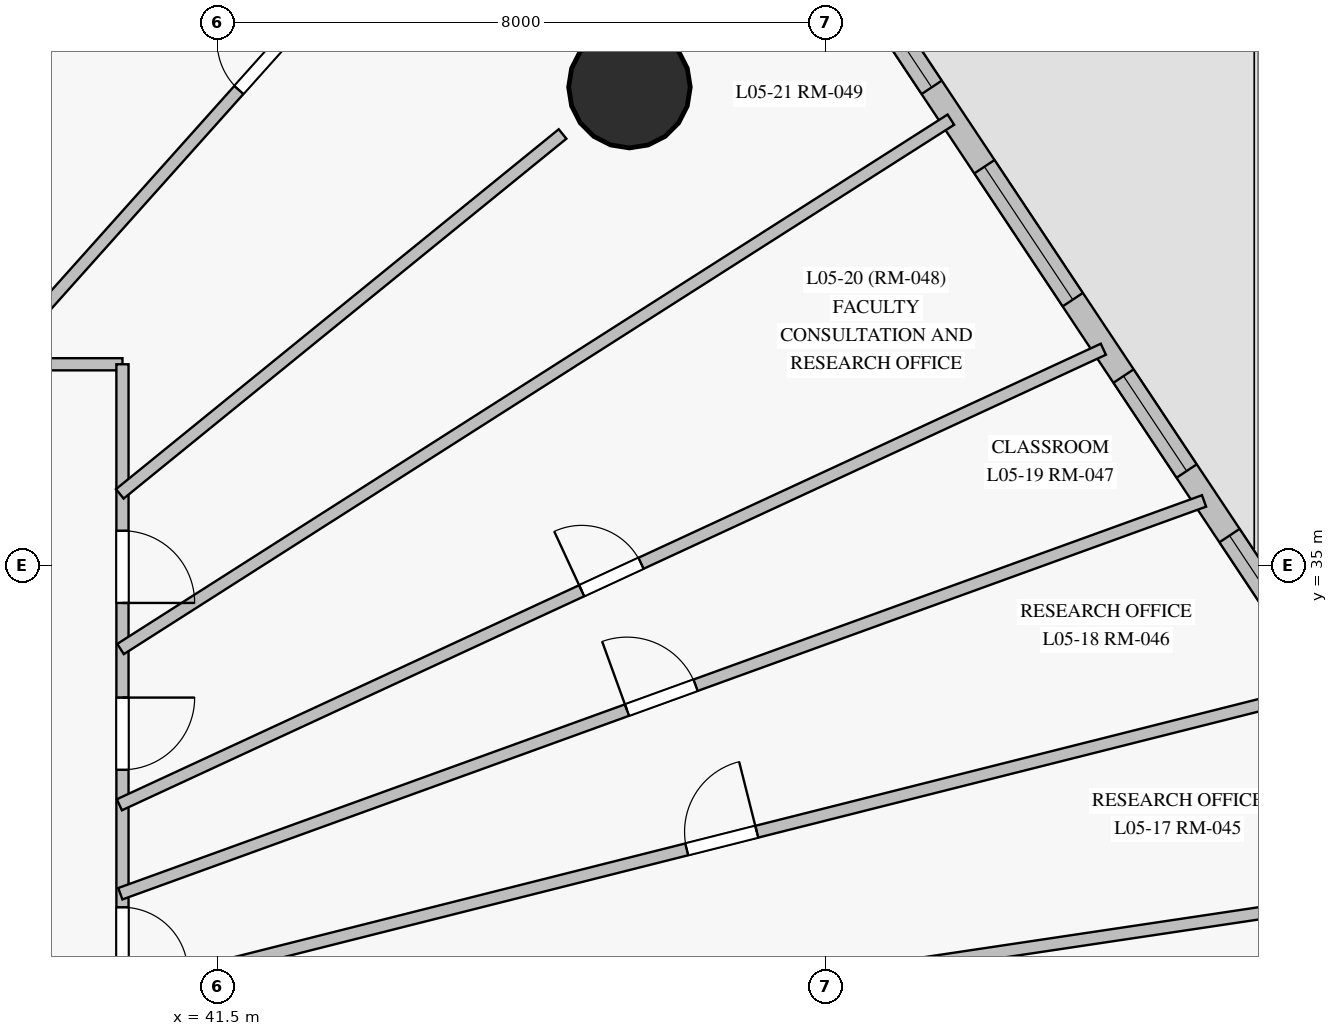
"""IFC4 building model, lengths in metres.
Left out: names, types, materials, properties, quantities, classifications, styles, units other than length and angle.
Written with IfcOpenShell. Run it as: python <this file> out.ifc"""

import sys

from ifc_helpers import new_model, si_unit, direction, frame, frame_2d, origin, origin_with_axes, origin_2d, place, context, subcontext, project, spatial, rectangle, circle, extrude, source, transform, mapped, element, fill, save


model = new_model("IFC4")
c1 = context("Model", 3, precision=1e-05, world=origin(), true_north=direction((0.0, 1.0)))
c2 = subcontext(c1, "Body", "Model", "MODEL_VIEW")
j1 = project(units=[si_unit("LENGTHUNIT", "METRE"), si_unit("PLANEANGLEUNIT", "RADIAN")], contexts=[c1])
p1 = place(None, origin())
s1 = spatial("IfcSite", under=j1, at=p1, CompositionType="ELEMENT")
p2 = place(p1, origin())
s2 = spatial("IfcBuilding", under=s1, at=p2, CompositionType="ELEMENT")
p3 = place(p2, frame((0.0, 0.0, 22.5)))
s3 = spatial("IfcBuildingStorey", under=s2, at=p3, CompositionType="ELEMENT", Elevation=22.5)
m1 = source(origin_with_axes(), c2, "Body", "SweptSolid", [
    extrude(circle(Radius=0.8, at=origin_2d()), origin(), (0.0, 0.0, 1.0), 4.0),
])
p4 = place(p3, frame((46.92, 41.296, 0.0), z_axis=(0.0, 0.0, 1.0), x_axis=(1.0, 0.0, 0.0)))
e1 = element("IfcColumn", 1, at=p4, inside=s3, PredefinedType="COLUMN", context=c2, shape_type="MappedRepresentation", body=[
    mapped(m1, transform((0.0, 0.0, 0.0), scale=1.0)),
])
p5 = place(p3, frame((54.797, 22.363, 0.0), z_axis=(0.0, 0.0, 1.0), x_axis=(0.148832722849, 0.988862387094, 0.0)))
e2 = element("IfcWall", 2, at=p5, inside=s3, PredefinedType="SOLIDWALL", context=c2, shape_type="SweptSolid", body=[
    extrude(rectangle(XDim=10.767, YDim=0.32, at=frame_2d((5.384, 0.0))), origin(), (0.0, 0.0, 1.0), 3.75),
])
p6 = place(p5, frame((0.574, 0.0, 0.85)))
e3 = element("IfcOpeningElement", 3, at=p6, cuts=e2, PredefinedType="OPENING", context=c2, shape_type="SweptSolid", body=[
    extrude(rectangle(XDim=1.8, YDim=1.85, at=frame_2d((0.9, 0.925))), frame((0.0, 0.17, 0.0), z_axis=(0.0, -1.0, 0.0), x_axis=(1.0, 0.0, 0.0)), (0.0, 0.0, 1.0), 0.34),
])
p7 = place(p5, frame((3.426, 0.0, 0.85)))
e4 = element("IfcOpeningElement", 4, at=p7, cuts=e2, PredefinedType="OPENING", context=c2, shape_type="SweptSolid", body=[
    extrude(rectangle(XDim=2.1, YDim=1.95, at=frame_2d((1.05, 0.975))), frame((0.0, 0.17, 0.0), z_axis=(0.0, -1.0, 0.0), x_axis=(1.0, 0.0, 0.0)), (0.0, 0.0, 1.0), 0.34),
])
p8 = place(p5, frame((8.734, 0.0, 0.85)))
e5 = element("IfcOpeningElement", 5, at=p8, cuts=e2, PredefinedType="OPENING", context=c2, shape_type="SweptSolid", body=[
    extrude(rectangle(XDim=1.5, YDim=1.85, at=frame_2d((0.75, 0.925))), frame((0.0, 0.17, 0.0), z_axis=(0.0, -1.0, 0.0), x_axis=(1.0, 0.0, 0.0)), (0.0, 0.0, 1.0), 0.34),
])
p9 = place(p3, frame((56.4, 33.01, 0.0), z_axis=(0.0, 0.0, 1.0), x_axis=(-0.553428968968, 0.832896377893, 0.0)))
e6 = element("IfcWall", 6, at=p9, inside=s3, PredefinedType="SOLIDWALL", context=c2, shape_type="SweptSolid", body=[
    extrude(rectangle(XDim=13.391, YDim=0.32, at=frame_2d((6.696, 0.0))), origin(), (0.0, 0.0, 1.0), 3.75),
])
p10 = place(p9, frame((1.064, 0.0, 0.85)))
e7 = element("IfcOpeningElement", 7, at=p10, cuts=e6, PredefinedType="OPENING", context=c2, shape_type="SweptSolid", body=[
    extrude(rectangle(XDim=1.8, YDim=1.85, at=frame_2d((0.9, 0.925))), frame((0.0, 0.17, 0.0), z_axis=(0.0, -1.0, 0.0), x_axis=(1.0, 0.0, 0.0)), (0.0, 0.0, 1.0), 0.34),
])
p11 = place(p9, frame((3.884, 0.0, 0.85)))
e8 = element("IfcOpeningElement", 8, at=p11, cuts=e6, PredefinedType="OPENING", context=c2, shape_type="SweptSolid", body=[
    extrude(rectangle(XDim=1.5, YDim=1.85, at=frame_2d((0.75, 0.925))), frame((0.0, 0.17, 0.0), z_axis=(0.0, -1.0, 0.0), x_axis=(1.0, 0.0, 0.0)), (0.0, 0.0, 1.0), 0.34),
])
p12 = place(p9, frame((6.591, 0.0, 0.85)))
e9 = element("IfcOpeningElement", 9, at=p12, cuts=e6, PredefinedType="OPENING", context=c2, shape_type="SweptSolid", body=[
    extrude(rectangle(XDim=2.1, YDim=1.95, at=frame_2d((1.05, 0.975))), frame((0.0, 0.17, 0.0), z_axis=(0.0, -1.0, 0.0), x_axis=(1.0, 0.0, 0.0)), (0.0, 0.0, 1.0), 0.34),
])
p13 = place(p9, frame((9.945, 0.0, 0.85)))
e10 = element("IfcOpeningElement", 10, at=p13, cuts=e6, PredefinedType="OPENING", context=c2, shape_type="SweptSolid", body=[
    extrude(rectangle(XDim=2.1, YDim=1.95, at=frame_2d((1.05, 0.975))), frame((0.0, 0.17, 0.0), z_axis=(0.0, -1.0, 0.0), x_axis=(1.0, 0.0, 0.0)), (0.0, 0.0, 1.0), 0.34),
])
p14 = place(p3, frame((10.5, 37.65, 0.0), z_axis=(0.0, 0.0, 1.0), x_axis=(1.0, 0.0, 0.0)))
e11 = element("IfcWall", 11, at=p14, inside=s3, PredefinedType="PARTITIONING", context=c2, shape_type="SweptSolid", body=[
    extrude(rectangle(XDim=29.75, YDim=0.16, at=frame_2d((14.875, 0.0))), origin(), (0.0, 0.0, 1.0), 3.15),
])
p15 = place(p14, frame((26.813, 0.0, 0.0)))
e12 = element("IfcOpeningElement", 12, at=p15, cuts=e11, PredefinedType="OPENING", context=c2, shape_type="SweptSolid", body=[
    extrude(rectangle(XDim=0.96, YDim=2.15, at=frame_2d((0.48, 1.075))), frame((0.0, 0.09, 0.0), z_axis=(0.0, -1.0, 0.0), x_axis=(1.0, 0.0, 0.0)), (0.0, 0.0, 1.0), 0.18),
])
p16 = place(p14, frame((24.312, 0.0, 0.0)))
e13 = element("IfcOpeningElement", 13, at=p16, cuts=e11, PredefinedType="OPENING", context=c2, shape_type="SweptSolid", body=[
    extrude(rectangle(XDim=0.95, YDim=2.15, at=frame_2d((0.475, 1.075))), frame((0.0, 0.09, 0.0), z_axis=(0.0, -1.0, 0.0), x_axis=(1.0, 0.0, 0.0)), (0.0, 0.0, 1.0), 0.18),
])
p17 = place(p14, frame((21.84, 0.0, 0.0)))
e14 = element("IfcOpeningElement", 14, at=p17, cuts=e11, PredefinedType="OPENING", context=c2, shape_type="SweptSolid", body=[
    extrude(rectangle(XDim=0.95, YDim=2.15, at=frame_2d((0.475, 1.075))), frame((0.0, 0.09, 0.0), z_axis=(0.0, -1.0, 0.0), x_axis=(1.0, 0.0, 0.0)), (0.0, 0.0, 1.0), 0.18),
])
p18 = place(p14, frame((19.498, 0.0, 0.0)))
e15 = element("IfcOpeningElement", 15, at=p18, cuts=e11, PredefinedType="OPENING", context=c2, shape_type="SweptSolid", body=[
    extrude(rectangle(XDim=0.96, YDim=2.15, at=frame_2d((0.48, 1.075))), frame((0.0, 0.09, 0.0), z_axis=(0.0, -1.0, 0.0), x_axis=(1.0, 0.0, 0.0)), (0.0, 0.0, 1.0), 0.18),
])
p19 = place(p14, frame((17.272, 0.0, 0.0)))
e16 = element("IfcOpeningElement", 16, at=p19, cuts=e11, PredefinedType="OPENING", context=c2, shape_type="SweptSolid", body=[
    extrude(rectangle(XDim=0.95, YDim=2.15, at=frame_2d((0.475, 1.075))), frame((0.0, 0.09, 0.0), z_axis=(0.0, -1.0, 0.0), x_axis=(1.0, 0.0, 0.0)), (0.0, 0.0, 1.0), 0.18),
])
p20 = place(p14, frame((15.625, 0.0, 0.0)))
e17 = element("IfcOpeningElement", 17, at=p20, cuts=e11, PredefinedType="OPENING", context=c2, shape_type="SweptSolid", body=[
    extrude(rectangle(XDim=0.95, YDim=2.15, at=frame_2d((0.475, 1.075))), frame((0.0, 0.09, 0.0), z_axis=(0.0, -1.0, 0.0), x_axis=(1.0, 0.0, 0.0)), (0.0, 0.0, 1.0), 0.18),
])
p21 = place(p14, frame((14.4, 0.0, 0.0)))
e18 = element("IfcOpeningElement", 18, at=p21, cuts=e11, PredefinedType="OPENING", context=c2, shape_type="SweptSolid", body=[
    extrude(rectangle(XDim=0.96, YDim=2.15, at=frame_2d((0.48, 1.075))), frame((0.0, 0.09, 0.0), z_axis=(0.0, -1.0, 0.0), x_axis=(1.0, 0.0, 0.0)), (0.0, 0.0, 1.0), 0.18),
])
p22 = place(p14, frame((9.938, 0.0, 0.0)))
e19 = element("IfcOpeningElement", 19, at=p22, cuts=e11, PredefinedType="OPENING", context=c2, shape_type="SweptSolid", body=[
    extrude(rectangle(XDim=0.95, YDim=2.15, at=frame_2d((0.475, 1.075))), frame((0.0, 0.09, 0.0), z_axis=(0.0, -1.0, 0.0), x_axis=(1.0, 0.0, 0.0)), (0.0, 0.0, 1.0), 0.18),
])
p23 = place(p3, frame((40.25, 37.65, 0.0), z_axis=(0.0, 0.0, 1.0), x_axis=(0.0, -1.0, 0.0)))
e20 = element("IfcWall", 20, at=p23, inside=s3, PredefinedType="PARTITIONING", context=c2, shape_type="SweptSolid", body=[
    extrude(rectangle(XDim=22.3, YDim=0.16, at=frame_2d((11.15, 0.0))), origin(), (0.0, 0.0, 1.0), 3.15),
])
p24 = place(p23, frame((16.25, 0.0, 0.0)))
e21 = element("IfcOpeningElement", 21, at=p24, cuts=e20, PredefinedType="OPENING", context=c2, shape_type="SweptSolid", body=[
    extrude(rectangle(XDim=0.95, YDim=2.15, at=frame_2d((0.475, 1.075))), frame((0.0, 0.09, 0.0), z_axis=(0.0, -1.0, 0.0), x_axis=(1.0, 0.0, 0.0)), (0.0, 0.0, 1.0), 0.18),
])
p25 = place(p23, frame((14.06, 0.0, 0.0)))
e22 = element("IfcOpeningElement", 22, at=p25, cuts=e20, PredefinedType="OPENING", context=c2, shape_type="SweptSolid", body=[
    extrude(rectangle(XDim=0.96, YDim=2.15, at=frame_2d((0.48, 1.075))), frame((0.0, 0.09, 0.0), z_axis=(0.0, -1.0, 0.0), x_axis=(1.0, 0.0, 0.0)), (0.0, 0.0, 1.0), 0.18),
])
p26 = place(p23, frame((12.235, 0.0, 0.0)))
e23 = element("IfcOpeningElement", 23, at=p26, cuts=e20, PredefinedType="OPENING", context=c2, shape_type="SweptSolid", body=[
    extrude(rectangle(XDim=0.95, YDim=2.15, at=frame_2d((0.475, 1.075))), frame((0.0, 0.09, 0.0), z_axis=(0.0, -1.0, 0.0), x_axis=(1.0, 0.0, 0.0)), (0.0, 0.0, 1.0), 0.18),
])
p27 = place(p23, frame((4.385, 0.0, 0.0)))
e24 = element("IfcOpeningElement", 24, at=p27, cuts=e20, PredefinedType="OPENING", context=c2, shape_type="SweptSolid", body=[
    extrude(rectangle(XDim=0.95, YDim=2.15, at=frame_2d((0.475, 1.075))), frame((0.0, 0.09, 0.0), z_axis=(0.0, -1.0, 0.0), x_axis=(1.0, 0.0, 0.0)), (0.0, 0.0, 1.0), 0.18),
])
p28 = place(p23, frame((2.19, 0.0, 0.0)))
e25 = element("IfcOpeningElement", 25, at=p28, cuts=e20, PredefinedType="OPENING", context=c2, shape_type="SweptSolid", body=[
    extrude(rectangle(XDim=0.95, YDim=2.15, at=frame_2d((0.475, 1.075))), frame((0.0, 0.09, 0.0), z_axis=(0.0, -1.0, 0.0), x_axis=(1.0, 0.0, 0.0)), (0.0, 0.0, 1.0), 0.18),
])
p29 = place(p23, frame((17.358, 0.0, 0.0)))
e26 = element("IfcOpeningElement", 26, at=p29, cuts=e20, PredefinedType="OPENING", context=c2, shape_type="SweptSolid", body=[
    extrude(rectangle(XDim=0.95, YDim=2.15, at=frame_2d((0.475, 1.075))), frame((0.0, 0.09, 0.0), z_axis=(0.0, -1.0, 0.0), x_axis=(1.0, 0.0, 0.0)), (0.0, 0.0, 1.0), 0.18),
])
p30 = place(p23, frame((18.489, 0.0, 0.0)))
e27 = element("IfcOpeningElement", 27, at=p30, cuts=e20, PredefinedType="OPENING", context=c2, shape_type="SweptSolid", body=[
    extrude(rectangle(XDim=0.95, YDim=2.15, at=frame_2d((0.475, 1.075))), frame((0.0, 0.09, 0.0), z_axis=(0.0, -1.0, 0.0), x_axis=(1.0, 0.0, 0.0)), (0.0, 0.0, 1.0), 0.18),
])
p31 = place(p23, frame((10.61, 0.0, 0.0)))
e28 = element("IfcOpeningElement", 28, at=p31, cuts=e20, PredefinedType="OPENING", context=c2, shape_type="SweptSolid", body=[
    extrude(rectangle(XDim=0.86, YDim=2.04, at=frame_2d((0.43, 1.02))), frame((0.0, 0.09, 0.0), z_axis=(0.0, -1.0, 0.0), x_axis=(1.0, 0.0, 0.0)), (0.0, 0.0, 1.0), 0.18),
])
p32 = place(p23, frame((8.378, 0.0, 0.0)))
e29 = element("IfcOpeningElement", 29, at=p32, cuts=e20, PredefinedType="OPENING", context=c2, shape_type="SweptSolid", body=[
    extrude(rectangle(XDim=0.86, YDim=2.04, at=frame_2d((0.43, 1.02))), frame((0.0, 0.09, 0.0), z_axis=(0.0, -1.0, 0.0), x_axis=(1.0, 0.0, 0.0)), (0.0, 0.0, 1.0), 0.18),
])
p33 = place(p23, frame((7.144, 0.0, 0.0)))
e30 = element("IfcOpeningElement", 30, at=p33, cuts=e20, PredefinedType="OPENING", context=c2, shape_type="SweptSolid", body=[
    extrude(rectangle(XDim=0.86, YDim=2.04, at=frame_2d((0.43, 1.02))), frame((0.0, 0.09, 0.0), z_axis=(0.0, -1.0, 0.0), x_axis=(1.0, 0.0, 0.0)), (0.0, 0.0, 1.0), 0.18),
])
p34 = place(p3, frame((40.206, 29.387, 0.0), z_axis=(0.0, 0.0, 1.0), x_axis=(0.969703998049, 0.24428294285, 0.0)))
e31 = element("IfcWall", 31, at=p34, inside=s3, PredefinedType="PARTITIONING", context=c2, shape_type="SweptSolid", body=[
    extrude(rectangle(XDim=16.401, YDim=0.16, at=frame_2d((8.201, 0.0))), origin(), (0.0, 0.0, 1.0), 3.75),
])
p35 = place(p34, frame((7.701, 0.0, 0.0)))
e32 = element("IfcOpeningElement", 32, at=p35, cuts=e31, PredefinedType="OPENING", context=c2, shape_type="SweptSolid", body=[
    extrude(rectangle(XDim=0.95, YDim=2.15, at=frame_2d((0.475, 1.075))), frame((0.0, 0.09, 0.0), z_axis=(0.0, -1.0, 0.0), x_axis=(1.0, 0.0, 0.0)), (0.0, 0.0, 1.0), 0.18),
])
p36 = place(p3, frame((40.22, 28.189, 0.0), z_axis=(0.0, 0.0, 1.0), x_axis=(0.989031993376, 0.147701442372, 0.0)))
e33 = element("IfcWall", 33, at=p36, inside=s3, PredefinedType="PARTITIONING", context=c2, shape_type="SweptSolid", body=[
    extrude(rectangle(XDim=15.956, YDim=0.16, at=frame_2d((7.978, 0.0))), origin(), (0.0, 0.0, 1.0), 3.75),
])
p37 = place(p3, frame((40.222, 30.685, 0.0), z_axis=(0.0, 0.0, 1.0), x_axis=(0.940161852345, 0.340728178166, 0.0)))
e34 = element("IfcWall", 34, at=p37, inside=s3, PredefinedType="PARTITIONING", context=c2, shape_type="SweptSolid", body=[
    extrude(rectangle(XDim=15.165, YDim=0.16, at=frame_2d((7.583, 0.0))), origin(), (0.0, 0.0, 1.0), 3.75),
])
p38 = place(p37, frame((7.09, 0.0, 0.0)))
e35 = element("IfcOpeningElement", 35, at=p38, cuts=e34, PredefinedType="OPENING", context=c2, shape_type="SweptSolid", body=[
    extrude(rectangle(XDim=0.96, YDim=2.15, at=frame_2d((0.48, 1.075))), frame((0.0, 0.09, 0.0), z_axis=(0.0, -1.0, 0.0), x_axis=(1.0, 0.0, 0.0)), (0.0, 0.0, 1.0), 0.18),
])
p39 = place(p3, frame((40.209, 31.855, 0.0), z_axis=(0.0, 0.0, 1.0), x_axis=(0.907470894389, 0.420114955502, 0.0)))
e36 = element("IfcWall", 36, at=p39, inside=s3, PredefinedType="PARTITIONING", context=c2, shape_type="SweptSolid", body=[
    extrude(rectangle(XDim=14.266, YDim=0.16, at=frame_2d((7.133, 0.0))), origin(), (0.0, 0.0, 1.0), 3.75),
])
p40 = place(p39, frame((6.703, 0.0, 0.0)))
e37 = element("IfcOpeningElement", 37, at=p40, cuts=e36, PredefinedType="OPENING", context=c2, shape_type="SweptSolid", body=[
    extrude(rectangle(XDim=0.86, YDim=2.04, at=frame_2d((0.43, 1.02))), frame((0.0, 0.09, 0.0), z_axis=(0.0, -1.0, 0.0), x_axis=(1.0, 0.0, 0.0)), (0.0, 0.0, 1.0), 0.18),
])
p41 = place(p3, frame((40.225, 33.904, 0.0), z_axis=(0.0, 0.0, 1.0), x_axis=(0.843218121952, 0.537571575524, 0.0)))
e38 = element("IfcWall", 38, at=p41, inside=s3, PredefinedType="PARTITIONING", context=c2, shape_type="SweptSolid", body=[
    extrude(rectangle(XDim=12.955, YDim=0.16, at=frame_2d((6.478, 0.0))), origin(), (0.0, 0.0, 1.0), 3.75),
])
p42 = place(p3, frame((36.01, 37.613, 0.0), z_axis=(0.0, 0.0, 1.0), x_axis=(0.556249955488, 0.831015034172, 0.0)))
e39 = element("IfcWall", 39, at=p42, inside=s3, PredefinedType="PARTITIONING", context=c2, shape_type="SweptSolid", body=[
    extrude(rectangle(XDim=11.771, YDim=0.16, at=frame_2d((5.886, 0.0))), origin(), (0.0, 0.0, 1.0), 3.75),
])
p43 = place(p3, frame((38.524, 37.616, 0.0), z_axis=(0.0, 0.0, 1.0), x_axis=(0.666694800969, 0.745330827459, 0.0)))
e40 = element("IfcWall", 40, at=p43, inside=s3, PredefinedType="PARTITIONING", context=c2, shape_type="SweptSolid", body=[
    extrude(rectangle(XDim=10.913, YDim=0.16, at=frame_2d((5.457, 0.0))), origin(), (0.0, 0.0, 1.0), 3.75),
])
p44 = place(p43, frame((4.886, 0.0, 0.0)))
e41 = element("IfcOpeningElement", 41, at=p44, cuts=e40, PredefinedType="OPENING", context=c2, shape_type="SweptSolid", body=[
    extrude(rectangle(XDim=0.86, YDim=2.04, at=frame_2d((0.43, 1.02))), frame((0.0, 0.09, 0.0), z_axis=(0.0, -1.0, 0.0), x_axis=(1.0, 0.0, 0.0)), (0.0, 0.0, 1.0), 0.18),
])
p45 = place(p3, frame((40.215, 35.945, 0.0), z_axis=(0.0, 0.0, 1.0), x_axis=(0.77599360837, 0.630740770657, 0.0)))
e42 = element("IfcWall", 42, at=p45, inside=s3, PredefinedType="PARTITIONING", context=c2, shape_type="SweptSolid", body=[
    extrude(rectangle(XDim=7.506, YDim=0.16, at=frame_2d((3.753, 0.0))), origin(), (0.0, 0.0, 1.0), 3.1),
])
m2 = source(origin_with_axes(), c2, "Body", "SweptSolid", [
    extrude(rectangle(XDim=1.8, YDim=1.85, at=frame_2d((0.9, 0.925))), frame((0.0, 0.03, 0.0), z_axis=(0.0, -1.0, 0.0), x_axis=(1.0, 0.0, 0.0)), (0.0, 0.0, 1.0), 0.06),
])
p46 = place(p10, origin())
e43 = element("IfcWindow", 43, at=p46, inside=s3, PartitioningType="SINGLE_PANEL", PredefinedType="WINDOW", context=c2, shape_type="MappedRepresentation", body=[
    mapped(m2, transform((0.0, 0.0, 0.0), scale=1.0)),
])
fill(e7, e43)
m3 = source(origin_with_axes(), c2, "Body", "SweptSolid", [
    extrude(rectangle(XDim=1.5, YDim=1.85, at=frame_2d((0.75, 0.925))), frame((0.0, 0.03, 0.0), z_axis=(0.0, -1.0, 0.0), x_axis=(1.0, 0.0, 0.0)), (0.0, 0.0, 1.0), 0.06),
])
p47 = place(p11, origin())
e44 = element("IfcWindow", 44, at=p47, inside=s3, PartitioningType="SINGLE_PANEL", PredefinedType="WINDOW", context=c2, shape_type="MappedRepresentation", body=[
    mapped(m3, transform((0.0, 0.0, 0.0), scale=1.0)),
])
fill(e8, e44)
m4 = source(origin_with_axes(), c2, "Body", "SweptSolid", [
    extrude(rectangle(XDim=2.1, YDim=1.95, at=frame_2d((1.05, 0.975))), frame((0.0, 0.03, 0.0), z_axis=(0.0, -1.0, 0.0), x_axis=(1.0, 0.0, 0.0)), (0.0, 0.0, 1.0), 0.06),
])
p48 = place(p12, origin())
e45 = element("IfcWindow", 45, at=p48, inside=s3, PartitioningType="SINGLE_PANEL", PredefinedType="WINDOW", context=c2, shape_type="MappedRepresentation", body=[
    mapped(m4, transform((0.0, 0.0, 0.0), scale=1.0)),
])
fill(e9, e45)
p49 = place(p13, origin())
e46 = element("IfcWindow", 46, at=p49, inside=s3, PartitioningType="SINGLE_PANEL", PredefinedType="WINDOW", context=c2, shape_type="MappedRepresentation", body=[
    mapped(m4, transform((0.0, 0.0, 0.0), scale=1.0)),
])
fill(e10, e46)
m5 = source(origin_with_axes(), c2, "Body", "SweptSolid", [
    extrude(rectangle(XDim=0.95, YDim=2.15, at=frame_2d((0.475, 1.075))), frame((0.0, 0.025, 0.0), z_axis=(0.0, -1.0, 0.0), x_axis=(1.0, 0.0, 0.0)), (0.0, 0.0, 1.0), 0.05),
])
p50 = place(p27, origin())
e47 = element("IfcDoor", 47, at=p50, inside=s3, OperationType="SINGLE_SWING_LEFT", PredefinedType="DOOR", context=c2, shape_type="MappedRepresentation", body=[
    mapped(m5, transform((0.0, 0.0, 0.0), scale=1.0)),
])
fill(e24, e47)
p51 = place(p28, origin())
e48 = element("IfcDoor", 48, at=p51, inside=s3, OperationType="SINGLE_SWING_RIGHT", PredefinedType="DOOR", context=c2, shape_type="MappedRepresentation", body=[
    mapped(m5, transform((0.0, 0.0, 0.0), scale=1.0)),
])
fill(e25, e48)
p52 = place(p35, origin())
e49 = element("IfcDoor", 49, at=p52, inside=s3, OperationType="SINGLE_SWING_RIGHT", PredefinedType="DOOR", context=c2, shape_type="MappedRepresentation", body=[
    mapped(m5, transform((0.0, 0.0, 0.0), scale=1.0)),
])
fill(e32, e49)
m6 = source(origin_with_axes(), c2, "Body", "SweptSolid", [
    extrude(rectangle(XDim=0.96, YDim=2.15, at=frame_2d((0.48, 1.075))), frame((0.0, 0.025, 0.0), z_axis=(0.0, -1.0, 0.0), x_axis=(1.0, 0.0, 0.0)), (0.0, 0.0, 1.0), 0.05),
])
p53 = place(p38, origin())
e50 = element("IfcDoor", 50, at=p53, inside=s3, OperationType="SINGLE_SWING_LEFT", PredefinedType="DOOR", context=c2, shape_type="MappedRepresentation", body=[
    mapped(m6, transform((0.0, 0.0, 0.0), scale=1.0)),
])
fill(e35, e50)
m7 = source(origin_with_axes(), c2, "Body", "SweptSolid", [
    extrude(rectangle(XDim=0.86, YDim=2.04, at=frame_2d((0.43, 1.02))), frame((0.0, 0.025, 0.0), z_axis=(0.0, -1.0, 0.0), x_axis=(1.0, 0.0, 0.0)), (0.0, 0.0, 1.0), 0.05),
])
p54 = place(p33, origin())
e51 = element("IfcDoor", 51, at=p54, inside=s3, OperationType="SINGLE_SWING_RIGHT", PredefinedType="DOOR", context=c2, shape_type="MappedRepresentation", body=[
    mapped(m7, transform((0.0, 0.0, 0.0), scale=1.0)),
])
fill(e30, e51)
p55 = place(p40, origin())
e52 = element("IfcDoor", 52, at=p55, inside=s3, OperationType="SINGLE_SWING_LEFT", PredefinedType="DOOR", context=c2, shape_type="MappedRepresentation", body=[
    mapped(m7, transform((0.0, 0.0, 0.0), scale=1.0)),
])
fill(e37, e52)
p56 = place(p44, origin())
e53 = element("IfcDoor", 53, at=p56, inside=s3, OperationType="SINGLE_SWING_RIGHT", PredefinedType="DOOR", context=c2, shape_type="MappedRepresentation", body=[
    mapped(m7, transform((0.0, 0.0, 0.0), scale=1.0)),
])
fill(e41, e53)
save(model, sys.argv[1])
